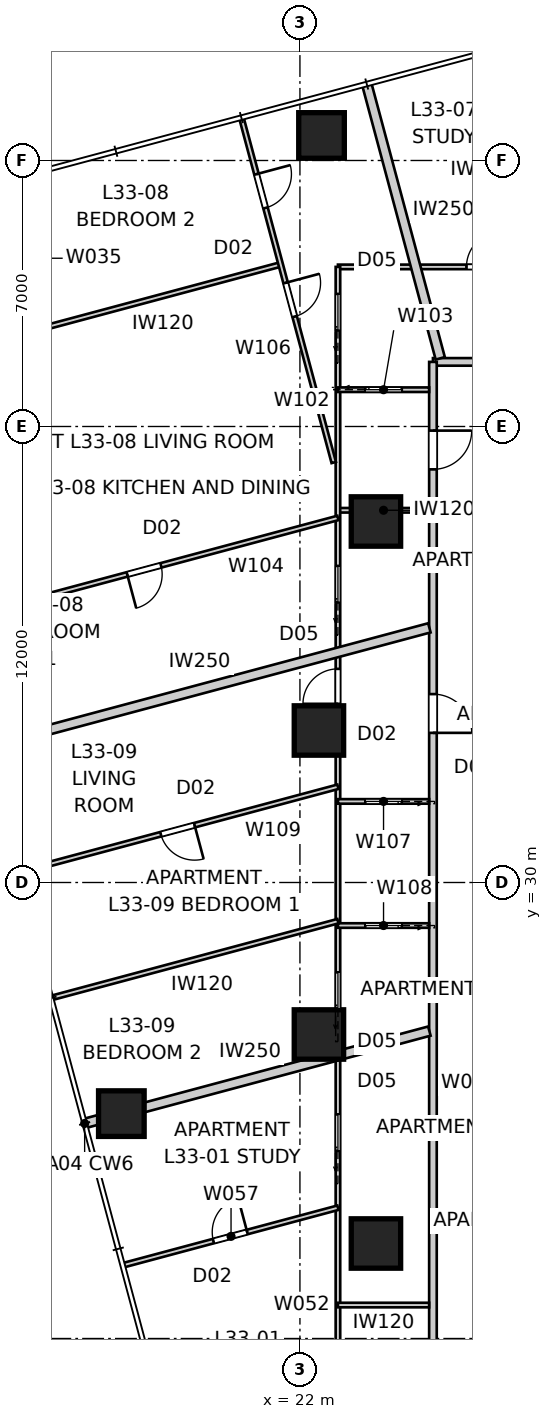
"""IFC4 building model, lengths in metres.
Left out: names, types, materials, properties, quantities, classifications, styles, units other than length and angle.
Written with IfcOpenShell. Run it as: python <this file> out.ifc"""

import sys

from ifc_helpers import new_model, si_unit, direction, frame, frame_2d, origin, origin_2d, place, context, subcontext, project, spatial, rectangle, extrude, element, fill, save


model = new_model("IFC4")
c1 = context("Model", 3, precision=1e-05, world=origin(), true_north=direction((0.0, 1.0)))
c2 = subcontext(c1, "Body", "Model", "MODEL_VIEW")
j1 = project(units=[si_unit("LENGTHUNIT", "METRE"), si_unit("PLANEANGLEUNIT", "RADIAN")], contexts=[c1])
p1 = place(None, origin())
s1 = spatial("IfcSite", under=j1, at=p1, CompositionType="ELEMENT")
p2 = place(p1, origin())
s2 = spatial("IfcBuilding", under=s1, at=p2, CompositionType="ELEMENT")
p3 = place(p2, frame((0.0, 0.0, 121.8)))
s3 = spatial("IfcBuildingStorey", under=s2, at=p3, CompositionType="ELEMENT", Elevation=121.8)
for number, where, z_axis, x_axis in (
    (1, (22.568, 49.658, 0.0), (0.0, 0.0, 1.0), (1.0, 0.0, 0.0)),
    (2, (17.301, 23.918, 0.0), (0.0, 0.0, 1.0), (1.0, 0.0, 0.0)),
):
    element("IfcColumn", number, at=place(p3, frame(where, z_axis=z_axis, x_axis=x_axis)), inside=s3, PredefinedType="COLUMN", context=c2, shape_type="SweptSolid", body=[
        extrude(rectangle(XDim=1.2, YDim=1.2, at=origin_2d()), origin(), (0.0, 0.0, 1.0), 3.4),
    ])
for number, where, z_axis, x_axis in (
    (3, (24.0, 39.5, 0.0), (0.0, 0.0, 1.0), (1.0, 0.0, 0.0)),
    (4, (22.5, 34.0, 0.0), (0.0, 0.0, 1.0), (1.0, 0.0, 0.0)),
    (5, (22.5, 26.0, 0.0), (0.0, 0.0, 1.0), (1.0, 0.0, 0.0)),
    (6, (24.0, 20.5, 0.0), (0.0, 0.0, 1.0), (1.0, 0.0, 0.0)),
):
    element("IfcColumn", number, at=place(p3, frame(where, z_axis=z_axis, x_axis=x_axis)), inside=s3, PredefinedType="COLUMN", context=c2, shape_type="SweptSolid", body=[
        extrude(rectangle(XDim=1.3, YDim=1.3, at=origin_2d()), origin(), (0.0, 0.0, 1.0), 3.4),
    ])
p4 = place(p3, frame((52.52, 43.7, 0.0), z_axis=(0.0, 0.0, 1.0), x_axis=(-1.0, 0.0, 0.0)))
e7 = element("IfcWall", 7, at=p4, inside=s3, PredefinedType="PARTITIONING", context=c2, shape_type="SweptSolid", body=[
    extrude(rectangle(XDim=27.02, YDim=0.2, at=frame_2d((13.51, 0.0))), origin(), (0.0, 0.0, 1.0), 3.25),
])
p5 = place(p4, frame((22.208, 0.0, 0.0)))
e8 = element("IfcOpeningElement", 8, at=p5, cuts=e7, PredefinedType="OPENING", context=c2, shape_type="SweptSolid", body=[
    extrude(rectangle(XDim=1.02, YDim=2.34, at=frame_2d((0.51, 1.17))), frame((0.0, 0.11, 0.0), z_axis=(0.0, -1.0, 0.0), x_axis=(1.0, 0.0, 0.0)), (0.0, 0.0, 1.0), 0.22),
])
p6 = place(p4, frame((1.856, 0.0, 0.0)))
e9 = element("IfcOpeningElement", 9, at=p6, cuts=e7, PredefinedType="OPENING", context=c2, shape_type="SweptSolid", body=[
    extrude(rectangle(XDim=1.02, YDim=2.34, at=frame_2d((0.51, 1.17))), frame((0.0, 0.11, 0.0), z_axis=(0.0, -1.0, 0.0), x_axis=(1.0, 0.0, 0.0)), (0.0, 0.0, 1.0), 0.22),
])
p7 = place(p3, frame((25.5, 43.7, 0.0), z_axis=(0.0, 0.0, 1.0), x_axis=(0.0, -1.0, 0.0)))
e10 = element("IfcWall", 10, at=p7, inside=s3, PredefinedType="PARTITIONING", context=c2, shape_type="SweptSolid", body=[
    extrude(rectangle(XDim=28.2, YDim=0.2, at=frame_2d((14.1, 0.0))), origin(), (0.0, 0.0, 1.0), 3.25),
])
p8 = place(p7, frame((8.742, 0.0, 0.0)))
e11 = element("IfcOpeningElement", 11, at=p8, cuts=e10, PredefinedType="OPENING", context=c2, shape_type="SweptSolid", body=[
    extrude(rectangle(XDim=1.02, YDim=2.34, at=frame_2d((0.51, 1.17))), frame((0.0, 0.11, 0.0), z_axis=(0.0, -1.0, 0.0), x_axis=(1.0, 0.0, 0.0)), (0.0, 0.0, 1.0), 0.22),
])
p9 = place(p7, frame((1.808, 0.0, 0.0)))
e12 = element("IfcOpeningElement", 12, at=p9, cuts=e10, PredefinedType="OPENING", context=c2, shape_type="SweptSolid", body=[
    extrude(rectangle(XDim=1.02, YDim=2.1, at=frame_2d((0.51, 1.05))), frame((0.0, 0.11, 0.0), z_axis=(0.0, -1.0, 0.0), x_axis=(1.0, 0.0, 0.0)), (0.0, 0.0, 1.0), 0.22),
])
p10 = place(p3, frame((23.758, 51.012, 0.0), z_axis=(0.0, 0.0, 1.0), x_axis=(0.258805213744, -0.965929532284, 0.0)))
e13 = element("IfcWall", 13, at=p10, inside=s3, PredefinedType="PARTITIONING", context=c2, shape_type="SweptSolid", body=[
    extrude(rectangle(XDim=7.473, YDim=0.25, at=frame_2d((3.737, 0.0))), origin(), (0.0, 0.0, 1.0), 3.25),
])
p11 = place(p3, frame((16.335, 23.659, 0.0), z_axis=(0.0, 0.0, 1.0), x_axis=(0.965927049013, 0.258814481793, 0.0)))
e14 = element("IfcWall", 14, at=p11, inside=s3, PredefinedType="PARTITIONING", context=c2, shape_type="SweptSolid", body=[
    extrude(rectangle(XDim=9.392, YDim=0.25, at=frame_2d((4.696, 0.0))), origin(), (0.0, 0.0, 1.0), 3.25),
])
p12 = place(p3, frame((13.682, 33.56, 0.0), z_axis=(0.0, 0.0, 1.0), x_axis=(0.965924438766, 0.258824223352, 0.0)))
e15 = element("IfcWall", 15, at=p12, inside=s3, PredefinedType="PARTITIONING", context=c2, shape_type="SweptSolid", body=[
    extrude(rectangle(XDim=12.138, YDim=0.25, at=frame_2d((6.069, 0.0))), origin(), (0.0, 0.0, 1.0), 3.25),
])
p13 = place(p3, frame((23.0, 14.833, 0.0), z_axis=(0.0, 0.0, 1.0), x_axis=(0.0, 1.0, 0.0)))
e16 = element("IfcWall", 16, at=p13, inside=s3, PredefinedType="PARTITIONING", context=c2, shape_type="SweptSolid", body=[
    extrude(rectangle(XDim=14.034, YDim=0.12, at=frame_2d((7.017, 0.0))), origin(), (0.0, 0.0, 1.0), 2.55),
])
p14 = place(p13, frame((11.843, 0.0, 0.0)))
e17 = element("IfcOpeningElement", 17, at=p14, cuts=e16, PredefinedType="OPENING", context=c2, shape_type="SweptSolid", body=[
    extrude(rectangle(XDim=0.96, YDim=2.1, at=frame_2d((0.48, 1.05))), frame((0.0, 0.07, 0.0), z_axis=(0.0, -1.0, 0.0), x_axis=(1.0, 0.0, 0.0)), (0.0, 0.0, 1.0), 0.14),
])
p15 = place(p13, frame((8.104, 0.0, 0.0)))
e18 = element("IfcOpeningElement", 18, at=p15, cuts=e16, PredefinedType="OPENING", context=c2, shape_type="SweptSolid", body=[
    extrude(rectangle(XDim=0.96, YDim=2.1, at=frame_2d((0.48, 1.05))), frame((0.0, 0.07, 0.0), z_axis=(0.0, -1.0, 0.0), x_axis=(1.0, 0.0, 0.0)), (0.0, 0.0, 1.0), 0.14),
])
p16 = place(p3, frame((25.4, 18.88, 0.0), z_axis=(0.0, 0.0, 1.0), x_axis=(-1.0, 0.0, 0.0)))
e19 = element("IfcWall", 19, at=p16, inside=s3, PredefinedType="PARTITIONING", context=c2, shape_type="SweptSolid", body=[
    extrude(rectangle(XDim=2.4, YDim=0.12, at=frame_2d((1.2, 0.0))), origin(), (0.0, 0.0, 1.0), 2.722),
])
p17 = place(p3, frame((17.374, 19.934, 0.0), z_axis=(0.0, 0.0, 1.0), x_axis=(0.965929528031, 0.258805229617, 0.0)))
e20 = element("IfcWall", 20, at=p17, inside=s3, PredefinedType="PARTITIONING", context=c2, shape_type="SweptSolid", body=[
    extrude(rectangle(XDim=5.824, YDim=0.12, at=frame_2d((2.912, 0.0))), origin(), (0.0, 0.0, 1.0), 3.25),
])
p18 = place(p17, frame((2.432, 0.0, 0.0)))
e21 = element("IfcOpeningElement", 21, at=p18, cuts=e20, PredefinedType="OPENING", context=c2, shape_type="SweptSolid", body=[
    extrude(rectangle(XDim=0.92, YDim=2.34, at=frame_2d((0.46, 1.17))), frame((0.0, 0.07, 0.0), z_axis=(0.0, -1.0, 0.0), x_axis=(1.0, 0.0, 0.0)), (0.0, 0.0, 1.0), 0.14),
])
p19 = place(p3, frame((23.0, 46.2, 0.0), z_axis=(0.0, 0.0, 1.0), x_axis=(1.0, 0.0, 0.0)))
e22 = element("IfcWall", 22, at=p19, inside=s3, PredefinedType="PARTITIONING", context=c2, shape_type="SweptSolid", body=[
    extrude(rectangle(XDim=33.2, YDim=0.12, at=frame_2d((16.6, 0.0))), origin(), (0.0, 0.0, 1.0), 2.55),
])
p20 = place(p19, frame((5.844, 0.0, 0.0)))
e23 = element("IfcOpeningElement", 23, at=p20, cuts=e22, PredefinedType="OPENING", context=c2, shape_type="SweptSolid", body=[
    extrude(rectangle(XDim=0.92, YDim=2.34, at=frame_2d((0.46, 1.17))), frame((0.0, 0.07, 0.0), z_axis=(0.0, -1.0, 0.0), x_axis=(1.0, 0.0, 0.0)), (0.0, 0.0, 1.0), 0.14),
])
p21 = place(p19, frame((3.382, 0.0, 0.0)))
e24 = element("IfcOpeningElement", 24, at=p21, cuts=e22, PredefinedType="OPENING", context=c2, shape_type="SweptSolid", body=[
    extrude(rectangle(XDim=0.92, YDim=2.34, at=frame_2d((0.46, 1.17))), frame((0.0, 0.07, 0.0), z_axis=(0.0, -1.0, 0.0), x_axis=(1.0, 0.0, 0.0)), (0.0, 0.0, 1.0), 0.14),
])
p22 = place(p19, frame((9.452, 0.0, 0.0)))
e25 = element("IfcOpeningElement", 25, at=p22, cuts=e22, PredefinedType="OPENING", context=c2, shape_type="SweptSolid", body=[
    extrude(rectangle(XDim=0.92, YDim=2.34, at=frame_2d((0.46, 1.17))), frame((0.0, 0.07, 0.0), z_axis=(0.0, -1.0, 0.0), x_axis=(1.0, 0.0, 0.0)), (0.0, 0.0, 1.0), 0.14),
])
p23 = place(p19, frame((27.775, 0.0, 0.0)))
e26 = element("IfcOpeningElement", 26, at=p23, cuts=e22, PredefinedType="OPENING", context=c2, shape_type="SweptSolid", body=[
    extrude(rectangle(XDim=0.92, YDim=2.34, at=frame_2d((0.46, 1.17))), frame((0.0, 0.07, 0.0), z_axis=(0.0, -1.0, 0.0), x_axis=(1.0, 0.0, 0.0)), (0.0, 0.0, 1.0), 0.14),
])
p24 = place(p19, frame((15.05, 0.0, 0.0)))
e27 = element("IfcOpeningElement", 27, at=p24, cuts=e22, PredefinedType="OPENING", context=c2, shape_type="SweptSolid", body=[
    extrude(rectangle(XDim=0.96, YDim=2.1, at=frame_2d((0.48, 1.05))), frame((0.0, 0.07, 0.0), z_axis=(0.0, -1.0, 0.0), x_axis=(1.0, 0.0, 0.0)), (0.0, 0.0, 1.0), 0.14),
])
p25 = place(p3, frame((25.4, 39.795, 0.0), z_axis=(0.0, 0.0, 1.0), x_axis=(-1.0, 0.0, 0.0)))
e28 = element("IfcWall", 28, at=p25, inside=s3, PredefinedType="PARTITIONING", context=c2, shape_type="SweptSolid", body=[
    extrude(rectangle(XDim=2.4, YDim=0.12, at=frame_2d((1.2, 0.0))), origin(), (0.0, 0.0, 1.0), 3.25),
])
p26 = place(p3, frame((23.0, 28.93, 0.0), z_axis=(0.0, 0.0, 1.0), x_axis=(0.0, 1.0, 0.0)))
e29 = element("IfcWall", 29, at=p26, inside=s3, PredefinedType="PARTITIONING", context=c2, shape_type="SweptSolid", body=[
    extrude(rectangle(XDim=17.27, YDim=0.12, at=frame_2d((8.635, 0.0))), origin(), (0.0, 0.0, 1.0), 2.55),
])
p27 = place(p26, frame((5.772, 0.0, 0.0)))
e30 = element("IfcOpeningElement", 30, at=p27, cuts=e29, PredefinedType="OPENING", context=c2, shape_type="SweptSolid", body=[
    extrude(rectangle(XDim=0.92, YDim=2.34, at=frame_2d((0.46, 1.17))), frame((0.0, 0.07, 0.0), z_axis=(0.0, -1.0, 0.0), x_axis=(1.0, 0.0, 0.0)), (0.0, 0.0, 1.0), 0.14),
])
p28 = place(p26, frame((15.599, 0.0, 0.0)))
e31 = element("IfcOpeningElement", 31, at=p28, cuts=e29, PredefinedType="OPENING", context=c2, shape_type="SweptSolid", body=[
    extrude(rectangle(XDim=0.96, YDim=2.1, at=frame_2d((0.48, 1.05))), frame((0.0, 0.07, 0.0), z_axis=(0.0, -1.0, 0.0), x_axis=(1.0, 0.0, 0.0)), (0.0, 0.0, 1.0), 0.14),
])
p29 = place(p26, frame((8.441, 0.0, 0.0)))
e32 = element("IfcOpeningElement", 32, at=p29, cuts=e29, PredefinedType="OPENING", context=c2, shape_type="SweptSolid", body=[
    extrude(rectangle(XDim=0.96, YDim=2.1, at=frame_2d((0.48, 1.05))), frame((0.0, 0.07, 0.0), z_axis=(0.0, -1.0, 0.0), x_axis=(1.0, 0.0, 0.0)), (0.0, 0.0, 1.0), 0.14),
])
p30 = place(p3, frame((23.0, 42.968, 0.0), z_axis=(0.0, 0.0, 1.0), x_axis=(1.0, 0.0, 0.0)))
e33 = element("IfcWall", 33, at=p30, inside=s3, PredefinedType="PARTITIONING", context=c2, shape_type="SweptSolid", body=[
    extrude(rectangle(XDim=2.4, YDim=0.12, at=frame_2d((1.2, 0.0))), origin(), (0.0, 0.0, 1.0), 3.25),
])
p31 = place(p30, frame((0.72, 0.0, 0.0)))
e34 = element("IfcOpeningElement", 34, at=p31, cuts=e33, PredefinedType="OPENING", context=c2, shape_type="SweptSolid", body=[
    extrude(rectangle(XDim=0.96, YDim=2.1, at=frame_2d((0.48, 1.05))), frame((0.0, 0.07, 0.0), z_axis=(0.0, -1.0, 0.0), x_axis=(1.0, 0.0, 0.0)), (0.0, 0.0, 1.0), 0.14),
])
p32 = place(p3, frame((23.0, 39.594, 0.0), z_axis=(0.0, 0.0, 1.0), x_axis=(-0.9659257847, -0.258819200315, 0.0)))
e35 = element("IfcWall", 35, at=p32, inside=s3, PredefinedType="PARTITIONING", context=c2, shape_type="SweptSolid", body=[
    extrude(rectangle(XDim=10.522, YDim=0.12, at=frame_2d((5.261, 0.0))), origin(), (0.0, 0.0, 1.0), 2.722),
])
p33 = place(p32, frame((4.821, 0.0, 0.0)))
e36 = element("IfcOpeningElement", 36, at=p33, cuts=e35, PredefinedType="OPENING", context=c2, shape_type="SweptSolid", body=[
    extrude(rectangle(XDim=0.92, YDim=2.34, at=frame_2d((0.46, 1.17))), frame((0.0, 0.07, 0.0), z_axis=(0.0, -1.0, 0.0), x_axis=(1.0, 0.0, 0.0)), (0.0, 0.0, 1.0), 0.14),
])
p34 = place(p3, frame((14.931, 44.506, 0.0), z_axis=(0.0, 0.0, 1.0), x_axis=(0.965922865286, 0.258830095464, 0.0)))
e37 = element("IfcWall", 37, at=p34, inside=s3, PredefinedType="PARTITIONING", context=c2, shape_type="SweptSolid", body=[
    extrude(rectangle(XDim=6.793, YDim=0.12, at=frame_2d((3.396, 0.0))), origin(), (0.0, 0.0, 1.0), 3.25),
])
p35 = place(p3, frame((20.468, 50.089, 0.0), z_axis=(0.0, 0.0, 1.0), x_axis=(0.25881390457, -0.965927203676, 0.0)))
e38 = element("IfcWall", 38, at=p35, inside=s3, PredefinedType="PARTITIONING", context=c2, shape_type="SweptSolid", body=[
    extrude(rectangle(XDim=9.357, YDim=0.12, at=frame_2d((4.678, 0.0))), origin(), (0.0, 0.0, 1.0), 2.638),
])
p36 = place(p35, frame((4.461, 0.0, 0.0)))
e39 = element("IfcOpeningElement", 39, at=p36, cuts=e38, PredefinedType="OPENING", context=c2, shape_type="SweptSolid", body=[
    extrude(rectangle(XDim=0.92, YDim=2.34, at=frame_2d((0.46, 1.17))), frame((0.0, 0.07, 0.0), z_axis=(0.0, -1.0, 0.0), x_axis=(1.0, 0.0, 0.0)), (0.0, 0.0, 1.0), 0.14),
])
p37 = place(p35, frame((1.5, 0.0, 0.0)))
e40 = element("IfcOpeningElement", 40, at=p37, cuts=e38, PredefinedType="OPENING", context=c2, shape_type="SweptSolid", body=[
    extrude(rectangle(XDim=0.92, YDim=2.34, at=frame_2d((0.46, 1.17))), frame((0.0, 0.07, 0.0), z_axis=(0.0, -1.0, 0.0), x_axis=(1.0, 0.0, 0.0)), (0.0, 0.0, 1.0), 0.14),
])
p38 = place(p3, frame((25.4, 32.134, 0.0), z_axis=(0.0, 0.0, 1.0), x_axis=(-1.0, 0.0, 0.0)))
e41 = element("IfcWall", 41, at=p38, inside=s3, PredefinedType="PARTITIONING", context=c2, shape_type="SweptSolid", body=[
    extrude(rectangle(XDim=2.4, YDim=0.12, at=frame_2d((1.2, 0.0))), origin(), (0.0, 0.0, 1.0), 3.25),
])
p39 = place(p38, frame((0.72, 0.0, 0.0)))
e42 = element("IfcOpeningElement", 42, at=p39, cuts=e41, PredefinedType="OPENING", context=c2, shape_type="SweptSolid", body=[
    extrude(rectangle(XDim=0.96, YDim=2.1, at=frame_2d((0.48, 1.05))), frame((0.0, 0.07, 0.0), z_axis=(0.0, -1.0, 0.0), x_axis=(1.0, 0.0, 0.0)), (0.0, 0.0, 1.0), 0.14),
])
p40 = place(p3, frame((25.4, 28.868, 0.0), z_axis=(0.0, 0.0, 1.0), x_axis=(-1.0, 0.0, 0.0)))
e43 = element("IfcWall", 43, at=p40, inside=s3, PredefinedType="PARTITIONING", context=c2, shape_type="SweptSolid", body=[
    extrude(rectangle(XDim=2.4, YDim=0.12, at=frame_2d((1.2, 0.0))), origin(), (0.0, 0.0, 1.0), 3.25),
])
p41 = place(p40, frame((0.72, 0.0, 0.0)))
e44 = element("IfcOpeningElement", 44, at=p41, cuts=e43, PredefinedType="OPENING", context=c2, shape_type="SweptSolid", body=[
    extrude(rectangle(XDim=0.96, YDim=2.1, at=frame_2d((0.48, 1.05))), frame((0.0, 0.07, 0.0), z_axis=(0.0, -1.0, 0.0), x_axis=(1.0, 0.0, 0.0)), (0.0, 0.0, 1.0), 0.14),
])
p42 = place(p3, frame((23.0, 32.519, 0.0), z_axis=(0.0, 0.0, 1.0), x_axis=(-0.965925607751, -0.258819860698, 0.0)))
e45 = element("IfcWall", 45, at=p42, inside=s3, PredefinedType="PARTITIONING", context=c2, shape_type="SweptSolid", body=[
    extrude(rectangle(XDim=8.691, YDim=0.12, at=frame_2d((4.346, 0.0))), origin(), (0.0, 0.0, 1.0), 3.25),
])
p43 = place(p42, frame((3.906, 0.0, 0.0)))
e46 = element("IfcOpeningElement", 46, at=p43, cuts=e45, PredefinedType="OPENING", context=c2, shape_type="SweptSolid", body=[
    extrude(rectangle(XDim=0.92, YDim=2.34, at=frame_2d((0.46, 1.17))), frame((0.0, 0.07, 0.0), z_axis=(0.0, -1.0, 0.0), x_axis=(1.0, 0.0, 0.0)), (0.0, 0.0, 1.0), 0.14),
])
p44 = place(p3, frame((23.0, 28.982, 0.0), z_axis=(0.0, 0.0, 1.0), x_axis=(-0.965927309482, -0.258813509689, 0.0)))
e47 = element("IfcWall", 47, at=p44, inside=s3, PredefinedType="PARTITIONING", context=c2, shape_type="SweptSolid", body=[
    extrude(rectangle(XDim=7.776, YDim=0.12, at=frame_2d((3.888, 0.0))), origin(), (0.0, 0.0, 1.0), 3.25),
])
p45 = place(p8, origin())
e48 = element("IfcDoor", 48, at=p45, inside=s3, OperationType="SINGLE_SWING_RIGHT", PredefinedType="DOOR", context=c2, shape_type="SweptSolid", body=[
    extrude(rectangle(XDim=1.02, YDim=2.34, at=frame_2d((0.51, 1.17))), frame((0.0, 0.025, 0.0), z_axis=(0.0, -1.0, 0.0), x_axis=(1.0, 0.0, 0.0)), (0.0, 0.0, 1.0), 0.05),
])
fill(e11, e48)
p46 = place(p9, origin())
e49 = element("IfcDoor", 49, at=p46, inside=s3, OperationType="SINGLE_SWING_LEFT", PredefinedType="DOOR", context=c2, shape_type="SweptSolid", body=[
    extrude(rectangle(XDim=1.02, YDim=2.1, at=frame_2d((0.51, 1.05))), frame((0.0, 0.025, 0.0), z_axis=(0.0, -1.0, 0.0), x_axis=(1.0, 0.0, 0.0)), (0.0, 0.0, 1.0), 0.05),
])
fill(e12, e49)
p47 = place(p21, origin())
e50 = element("IfcDoor", 50, at=p47, inside=s3, OperationType="SINGLE_SWING_RIGHT", PredefinedType="DOOR", context=c2, shape_type="SweptSolid", body=[
    extrude(rectangle(XDim=0.92, YDim=2.34, at=frame_2d((0.46, 1.17))), frame((0.0, 0.025, 0.0), z_axis=(0.0, -1.0, 0.0), x_axis=(1.0, 0.0, 0.0)), (0.0, 0.0, 1.0), 0.05),
])
fill(e24, e50)
p48 = place(p27, origin())
e51 = element("IfcDoor", 51, at=p48, inside=s3, OperationType="SINGLE_SWING_LEFT", PredefinedType="DOOR", context=c2, shape_type="SweptSolid", body=[
    extrude(rectangle(XDim=0.92, YDim=2.34, at=frame_2d((0.46, 1.17))), frame((0.0, 0.025, 0.0), z_axis=(0.0, -1.0, 0.0), x_axis=(1.0, 0.0, 0.0)), (0.0, 0.0, 1.0), 0.05),
])
fill(e30, e51)
p49 = place(p39, origin())
e52 = element("IfcDoor", 52, at=p49, inside=s3, OperationType="SLIDING_TO_LEFT", PredefinedType="DOOR", context=c2, shape_type="SweptSolid", body=[
    extrude(rectangle(XDim=0.96, YDim=2.1, at=frame_2d((0.48, 1.05))), frame((0.0, 0.025, 0.0), z_axis=(0.0, -1.0, 0.0), x_axis=(1.0, 0.0, 0.0)), (0.0, 0.0, 1.0), 0.05),
])
fill(e42, e52)
p50 = place(p31, origin())
e53 = element("IfcDoor", 53, at=p50, inside=s3, OperationType="SLIDING_TO_LEFT", PredefinedType="DOOR", context=c2, shape_type="SweptSolid", body=[
    extrude(rectangle(XDim=0.96, YDim=2.1, at=frame_2d((0.48, 1.05))), frame((0.0, 0.025, 0.0), z_axis=(0.0, -1.0, 0.0), x_axis=(1.0, 0.0, 0.0)), (0.0, 0.0, 1.0), 0.05),
])
fill(e34, e53)
p51 = place(p43, origin())
e54 = element("IfcDoor", 54, at=p51, inside=s3, OperationType="SINGLE_SWING_LEFT", PredefinedType="DOOR", context=c2, shape_type="SweptSolid", body=[
    extrude(rectangle(XDim=0.92, YDim=2.34, at=frame_2d((0.46, 1.17))), frame((0.0, 0.025, 0.0), z_axis=(0.0, -1.0, 0.0), x_axis=(1.0, 0.0, 0.0)), (0.0, 0.0, 1.0), 0.05),
])
fill(e46, e54)
p52 = place(p41, origin())
e55 = element("IfcDoor", 55, at=p52, inside=s3, OperationType="SLIDING_TO_LEFT", PredefinedType="DOOR", context=c2, shape_type="SweptSolid", body=[
    extrude(rectangle(XDim=0.96, YDim=2.1, at=frame_2d((0.48, 1.05))), frame((0.0, 0.025, 0.0), z_axis=(0.0, -1.0, 0.0), x_axis=(1.0, 0.0, 0.0)), (0.0, 0.0, 1.0), 0.05),
])
fill(e44, e55)
p53 = place(p28, origin())
e56 = element("IfcDoor", 56, at=p53, inside=s3, OperationType="SLIDING_TO_LEFT", PredefinedType="DOOR", context=c2, shape_type="SweptSolid", body=[
    extrude(rectangle(XDim=0.96, YDim=2.1, at=frame_2d((0.48, 1.05))), frame((0.0, 0.025, 0.0), z_axis=(0.0, -1.0, 0.0), x_axis=(1.0, 0.0, 0.0)), (0.0, 0.0, 1.0), 0.05),
])
fill(e31, e56)
p54 = place(p14, origin())
e57 = element("IfcDoor", 57, at=p54, inside=s3, OperationType="SLIDING_TO_LEFT", PredefinedType="DOOR", context=c2, shape_type="SweptSolid", body=[
    extrude(rectangle(XDim=0.96, YDim=2.1, at=frame_2d((0.48, 1.05))), frame((0.0, 0.025, 0.0), z_axis=(0.0, -1.0, 0.0), x_axis=(1.0, 0.0, 0.0)), (0.0, 0.0, 1.0), 0.05),
])
fill(e17, e57)
p55 = place(p18, origin())
e58 = element("IfcDoor", 58, at=p55, inside=s3, OperationType="SINGLE_SWING_RIGHT", PredefinedType="DOOR", context=c2, shape_type="SweptSolid", body=[
    extrude(rectangle(XDim=0.92, YDim=2.34, at=frame_2d((0.46, 1.17))), frame((0.0, 0.025, 0.0), z_axis=(0.0, -1.0, 0.0), x_axis=(1.0, 0.0, 0.0)), (0.0, 0.0, 1.0), 0.05),
])
fill(e21, e58)
p56 = place(p15, origin())
e59 = element("IfcDoor", 59, at=p56, inside=s3, OperationType="SLIDING_TO_LEFT", PredefinedType="DOOR", context=c2, shape_type="SweptSolid", body=[
    extrude(rectangle(XDim=0.96, YDim=2.1, at=frame_2d((0.48, 1.05))), frame((0.0, 0.025, 0.0), z_axis=(0.0, -1.0, 0.0), x_axis=(1.0, 0.0, 0.0)), (0.0, 0.0, 1.0), 0.05),
])
fill(e18, e59)
p57 = place(p36, origin())
e60 = element("IfcDoor", 60, at=p57, inside=s3, OperationType="SINGLE_SWING_LEFT", PredefinedType="DOOR", context=c2, shape_type="SweptSolid", body=[
    extrude(rectangle(XDim=0.92, YDim=2.34, at=frame_2d((0.46, 1.17))), frame((0.0, 0.025, 0.0), z_axis=(0.0, -1.0, 0.0), x_axis=(1.0, 0.0, 0.0)), (0.0, 0.0, 1.0), 0.05),
])
fill(e39, e60)
p58 = place(p37, origin())
e61 = element("IfcDoor", 61, at=p58, inside=s3, OperationType="SINGLE_SWING_LEFT", PredefinedType="DOOR", context=c2, shape_type="SweptSolid", body=[
    extrude(rectangle(XDim=0.92, YDim=2.34, at=frame_2d((0.46, 1.17))), frame((0.0, 0.025, 0.0), z_axis=(0.0, -1.0, 0.0), x_axis=(1.0, 0.0, 0.0)), (0.0, 0.0, 1.0), 0.05),
])
fill(e40, e61)
p59 = place(p33, origin())
e62 = element("IfcDoor", 62, at=p59, inside=s3, OperationType="SINGLE_SWING_RIGHT", PredefinedType="DOOR", context=c2, shape_type="SweptSolid", body=[
    extrude(rectangle(XDim=0.92, YDim=2.34, at=frame_2d((0.46, 1.17))), frame((0.0, 0.025, 0.0), z_axis=(0.0, -1.0, 0.0), x_axis=(1.0, 0.0, 0.0)), (0.0, 0.0, 1.0), 0.05),
])
fill(e36, e62)
p60 = place(p29, origin())
e63 = element("IfcDoor", 63, at=p60, inside=s3, OperationType="SLIDING_TO_LEFT", PredefinedType="DOOR", context=c2, shape_type="SweptSolid", body=[
    extrude(rectangle(XDim=0.96, YDim=2.1, at=frame_2d((0.48, 1.05))), frame((0.0, 0.025, 0.0), z_axis=(0.0, -1.0, 0.0), x_axis=(1.0, 0.0, 0.0)), (0.0, 0.0, 1.0), 0.05),
])
fill(e32, e63)
save(model, sys.argv[1])
